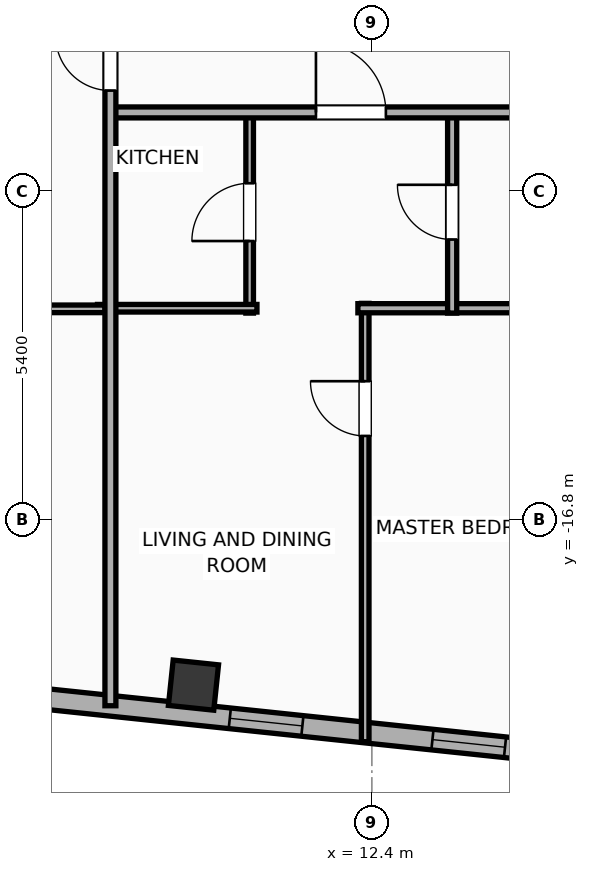
"""IFC4 building model, lengths in metres.
Left out: names, types, materials, properties, quantities, classifications, styles, units other than length and angle.
Written with IfcOpenShell. Run it as: python <this file> out.ifc"""

import sys

from ifc_helpers import new_model, si_unit, direction, frame, frame_2d, origin, origin_2d, place, context, subcontext, project, spatial, rectangle, hollow_rectangle, extrude, element, fill, save


model = new_model("IFC4")
c1 = context("Model", 3, precision=1e-05, world=origin(), true_north=direction((0.0, 1.0)))
c2 = subcontext(c1, "Body", "Model", "MODEL_VIEW")
j1 = project(units=[si_unit("LENGTHUNIT", "METRE"), si_unit("PLANEANGLEUNIT", "RADIAN")], contexts=[c1])
p1 = place(None, origin())
s1 = spatial("IfcSite", under=j1, at=p1, CompositionType="ELEMENT")
p2 = place(p1, origin())
s2 = spatial("IfcBuilding", under=s1, at=p2, CompositionType="ELEMENT")
p3 = place(p2, frame((0.0, 0.0, 299.0)))
s3 = spatial("IfcBuildingStorey", under=s2, at=p3, CompositionType="ELEMENT", Elevation=299.0)
p4 = place(p3, frame((9.466, -19.518, 0.0), z_axis=(0.0, 0.0, 1.0), x_axis=(0.994521895368, -0.104528463268, 0.0)))
e1 = element("IfcColumn", 1, at=p4, inside=s3, PredefinedType="COLUMN", context=c2, shape_type="SweptSolid", body=[
    extrude(hollow_rectangle(XDim=0.75, YDim=0.75, WallThickness=0.025, at=origin_2d()), origin(), (0.0, 0.0, 1.0), 3.9),
])
p5 = place(p3, frame((18.708, -20.972, 0.0), z_axis=(0.0, 0.0, 1.0), x_axis=(-0.994521888554, 0.104528528102, 0.0)))
e2 = element("IfcWall", 2, at=p5, inside=s3, PredefinedType="ELEMENTEDWALL", context=c2, shape_type="SweptSolid", body=[
    extrude(rectangle(XDim=46.766, YDim=0.34, at=frame_2d((23.383, 0.0))), origin(), (0.0, 0.0, 1.0), 3.635),
])
p6 = place(p5, frame((23.733, 0.0, 0.65)))
e3 = element("IfcOpeningElement", 3, at=p6, cuts=e2, PredefinedType="OPENING", context=c2, shape_type="SweptSolid", body=[
    extrude(rectangle(XDim=2.6, YDim=2.45, at=frame_2d((1.3, 1.225))), frame((0.0, 0.18, 0.0), z_axis=(0.0, -1.0, 0.0), x_axis=(1.0, 0.0, 0.0)), (0.0, 0.0, 1.0), 0.36),
])
p7 = place(p5, frame((44.402, 0.0, 0.75)))
e4 = element("IfcOpeningElement", 4, at=p7, cuts=e2, PredefinedType="OPENING", context=c2, shape_type="SweptSolid", body=[
    extrude(rectangle(XDim=1.2, YDim=2.05, at=frame_2d((0.6, 1.025))), frame((0.0, 0.18, 0.0), z_axis=(0.0, -1.0, 0.0), x_axis=(1.0, 0.0, 0.0)), (0.0, 0.0, 1.0), 0.36),
])
p8 = place(p5, frame((39.553, 0.0, 0.75)))
e5 = element("IfcOpeningElement", 5, at=p8, cuts=e2, PredefinedType="OPENING", context=c2, shape_type="SweptSolid", body=[
    extrude(rectangle(XDim=1.2, YDim=2.05, at=frame_2d((0.6, 1.025))), frame((0.0, 0.18, 0.0), z_axis=(0.0, -1.0, 0.0), x_axis=(1.0, 0.0, 0.0)), (0.0, 0.0, 1.0), 0.36),
])
p9 = place(p5, frame((42.419, 0.0, 0.75)))
e6 = element("IfcOpeningElement", 6, at=p9, cuts=e2, PredefinedType="OPENING", context=c2, shape_type="SweptSolid", body=[
    extrude(rectangle(XDim=1.2, YDim=2.05, at=frame_2d((0.6, 1.025))), frame((0.0, 0.18, 0.0), z_axis=(0.0, -1.0, 0.0), x_axis=(1.0, 0.0, 0.0)), (0.0, 0.0, 1.0), 0.36),
])
p10 = place(p5, frame((34.933, 0.0, 0.75)))
e7 = element("IfcOpeningElement", 7, at=p10, cuts=e2, PredefinedType="OPENING", context=c2, shape_type="SweptSolid", body=[
    extrude(rectangle(XDim=1.2, YDim=2.05, at=frame_2d((0.6, 1.025))), frame((0.0, 0.18, 0.0), z_axis=(0.0, -1.0, 0.0), x_axis=(1.0, 0.0, 0.0)), (0.0, 0.0, 1.0), 0.36),
])
p11 = place(p5, frame((28.692, 0.0, 0.75)))
e8 = element("IfcOpeningElement", 8, at=p11, cuts=e2, PredefinedType="OPENING", context=c2, shape_type="SweptSolid", body=[
    extrude(rectangle(XDim=1.2, YDim=2.05, at=frame_2d((0.6, 1.025))), frame((0.0, 0.18, 0.0), z_axis=(0.0, -1.0, 0.0), x_axis=(1.0, 0.0, 0.0)), (0.0, 0.0, 1.0), 0.36),
])
p12 = place(p5, frame((30.957, 0.0, 0.75)))
e9 = element("IfcOpeningElement", 9, at=p12, cuts=e2, PredefinedType="OPENING", context=c2, shape_type="SweptSolid", body=[
    extrude(rectangle(XDim=1.2, YDim=2.05, at=frame_2d((0.6, 1.025))), frame((0.0, 0.18, 0.0), z_axis=(0.0, -1.0, 0.0), x_axis=(1.0, 0.0, 0.0)), (0.0, 0.0, 1.0), 0.36),
])
p13 = place(p5, frame((7.492, 0.0, 0.75)))
e10 = element("IfcOpeningElement", 10, at=p13, cuts=e2, PredefinedType="OPENING", context=c2, shape_type="SweptSolid", body=[
    extrude(rectangle(XDim=1.2, YDim=2.05, at=frame_2d((0.6, 1.025))), frame((0.0, 0.18, 0.0), z_axis=(0.0, -1.0, 0.0), x_axis=(1.0, 0.0, 0.0)), (0.0, 0.0, 1.0), 0.36),
])
p14 = place(p5, frame((4.141, 0.0, 0.75)))
e11 = element("IfcOpeningElement", 11, at=p14, cuts=e2, PredefinedType="OPENING", context=c2, shape_type="SweptSolid", body=[
    extrude(rectangle(XDim=1.2, YDim=2.05, at=frame_2d((0.6, 1.025))), frame((0.0, 0.18, 0.0), z_axis=(0.0, -1.0, 0.0), x_axis=(1.0, 0.0, 0.0)), (0.0, 0.0, 1.0), 0.36),
])
p15 = place(p5, frame((1.36, 0.0, 0.75)))
e12 = element("IfcOpeningElement", 12, at=p15, cuts=e2, PredefinedType="OPENING", context=c2, shape_type="SweptSolid", body=[
    extrude(rectangle(XDim=1.2, YDim=2.05, at=frame_2d((0.6, 1.025))), frame((0.0, 0.18, 0.0), z_axis=(0.0, -1.0, 0.0), x_axis=(1.0, 0.0, 0.0)), (0.0, 0.0, 1.0), 0.36),
])
p16 = place(p5, frame((20.254, 0.0, 0.75)))
e13 = element("IfcOpeningElement", 13, at=p16, cuts=e2, PredefinedType="OPENING", context=c2, shape_type="SweptSolid", body=[
    extrude(rectangle(XDim=1.2, YDim=2.05, at=frame_2d((0.6, 1.025))), frame((0.0, 0.18, 0.0), z_axis=(0.0, -1.0, 0.0), x_axis=(1.0, 0.0, 0.0)), (0.0, 0.0, 1.0), 0.36),
])
p17 = place(p5, frame((16.172, 0.0, 0.75)))
e14 = element("IfcOpeningElement", 14, at=p17, cuts=e2, PredefinedType="OPENING", context=c2, shape_type="SweptSolid", body=[
    extrude(rectangle(XDim=1.2, YDim=2.05, at=frame_2d((0.6, 1.025))), frame((0.0, 0.18, 0.0), z_axis=(0.0, -1.0, 0.0), x_axis=(1.0, 0.0, 0.0)), (0.0, 0.0, 1.0), 0.36),
])
p18 = place(p5, frame((12.11, 0.0, 0.75)))
e15 = element("IfcOpeningElement", 15, at=p18, cuts=e2, PredefinedType="OPENING", context=c2, shape_type="SweptSolid", body=[
    extrude(rectangle(XDim=1.2, YDim=2.05, at=frame_2d((0.6, 1.025))), frame((0.0, 0.18, 0.0), z_axis=(0.0, -1.0, 0.0), x_axis=(1.0, 0.0, 0.0)), (0.0, 0.0, 1.0), 0.36),
])
p19 = place(p3, frame((12.29, -20.448, 0.0), z_axis=(0.0, 0.0, 1.0), x_axis=(0.0, 1.0, 0.0)))
e16 = element("IfcWall", 16, at=p19, inside=s3, PredefinedType="PARTITIONING", context=c2, shape_type="SweptSolid", body=[
    extrude(rectangle(XDim=7.208, YDim=0.125, at=frame_2d((3.604, 0.0))), origin(), (0.0, 0.0, 1.0), 3.635),
])
p20 = place(p19, frame((5.028, 0.0, 0.0)))
e17 = element("IfcOpeningElement", 17, at=p20, cuts=e16, PredefinedType="OPENING", context=c2, shape_type="SweptSolid", body=[
    extrude(rectangle(XDim=0.9, YDim=2.05, at=frame_2d((0.45, 1.025))), frame((0.0, 0.073, 0.0), z_axis=(0.0, -1.0, 0.0), x_axis=(1.0, 0.0, 0.0)), (0.0, 0.0, 1.0), 0.145),
])
p21 = place(p3, frame((12.17, -13.32, 0.0), z_axis=(0.0, 0.0, 1.0), x_axis=(1.0, 0.0, 0.0)))
e18 = element("IfcWall", 18, at=p21, inside=s3, PredefinedType="PLUMBINGWALL", context=c2, shape_type="SweptSolid", body=[
    extrude(rectangle(XDim=3.605, YDim=0.15, at=frame_2d((1.802, 0.0))), origin(), (0.0, 0.0, 1.0), 3.635),
])
p22 = place(p3, frame((10.39, -13.4, 0.0), z_axis=(0.0, 0.0, 1.0), x_axis=(0.0, 1.0, 0.0)))
e19 = element("IfcWall", 19, at=p22, inside=s3, PredefinedType="PARTITIONING", context=c2, shape_type="SweptSolid", body=[
    extrude(rectangle(XDim=3.32, YDim=0.125, at=frame_2d((1.66, 0.0))), origin(), (0.0, 0.0, 1.0), 3.635),
])
p23 = place(p22, frame((1.185, 0.0, 0.0)))
e20 = element("IfcOpeningElement", 20, at=p23, cuts=e19, PredefinedType="OPENING", context=c2, shape_type="SweptSolid", body=[
    extrude(rectangle(XDim=0.95, YDim=2.05, at=frame_2d((0.475, 1.025))), frame((0.0, 0.073, 0.0), z_axis=(0.0, -1.0, 0.0), x_axis=(1.0, 0.0, 0.0)), (0.0, 0.0, 1.0), 0.145),
])
p24 = place(p3, frame((7.887, -13.32, 0.0), z_axis=(0.0, 0.0, 1.0), x_axis=(1.0, 0.0, 0.0)))
e21 = element("IfcWall", 21, at=p24, inside=s3, PredefinedType="PARTITIONING", context=c2, shape_type="SweptSolid", body=[
    extrude(rectangle(XDim=2.623, YDim=0.125, at=frame_2d((1.311, 0.0))), origin(), (0.0, 0.0, 1.0), 3.635),
])
p25 = place(p3, frame((13.72, -13.4, 0.0), z_axis=(0.0, 0.0, 1.0), x_axis=(0.0, 1.0, 0.0)))
e22 = element("IfcWall", 22, at=p25, inside=s3, PredefinedType="PLUMBINGWALL", context=c2, shape_type="SweptSolid", body=[
    extrude(rectangle(XDim=3.32, YDim=0.15, at=frame_2d((1.66, 0.0))), origin(), (0.0, 0.0, 1.0), 3.635),
])
p26 = place(p25, frame((1.21, 0.0, 0.0)))
e23 = element("IfcOpeningElement", 23, at=p26, cuts=e22, PredefinedType="OPENING", context=c2, shape_type="SweptSolid", body=[
    extrude(rectangle(XDim=0.9, YDim=2.05, at=frame_2d((0.45, 1.025))), frame((0.0, 0.085, 0.0), z_axis=(0.0, -1.0, 0.0), x_axis=(1.0, 0.0, 0.0)), (0.0, 0.0, 1.0), 0.17),
])
p27 = place(p3, frame((8.08, -10.1, 0.0), z_axis=(0.0, 0.0, 1.0), x_axis=(1.0, 0.0, 0.0)))
e24 = element("IfcWall", 24, at=p27, inside=s3, PredefinedType="PARTITIONING", context=c2, shape_type="SweptSolid", body=[
    extrude(rectangle(XDim=15.236, YDim=0.18, at=frame_2d((7.618, 0.0))), origin(), (0.0, 0.0, 1.0), 3.635),
])
p28 = place(p27, frame((3.4, 0.0, 0.0)))
e25 = element("IfcOpeningElement", 25, at=p28, cuts=e24, PredefinedType="OPENING", context=c2, shape_type="SweptSolid", body=[
    extrude(rectangle(XDim=1.15, YDim=2.05, at=frame_2d((0.575, 1.025))), frame((0.0, 0.1, 0.0), z_axis=(0.0, -1.0, 0.0), x_axis=(1.0, 0.0, 0.0)), (0.0, 0.0, 1.0), 0.2),
])
p29 = place(p27, frame((11.05, 0.0, 0.0)))
e26 = element("IfcOpeningElement", 26, at=p29, cuts=e24, PredefinedType="OPENING", context=c2, shape_type="SweptSolid", body=[
    extrude(rectangle(XDim=1.15, YDim=2.05, at=frame_2d((0.575, 1.025))), frame((0.0, 0.1, 0.0), z_axis=(0.0, -1.0, 0.0), x_axis=(1.0, 0.0, 0.0)), (0.0, 0.0, 1.0), 0.2),
])
p30 = place(p3, frame((0.02, -13.33, 0.0), z_axis=(0.0, 0.0, 1.0), x_axis=(1.0, 0.0, 0.0)))
e27 = element("IfcWall", 27, at=p30, inside=s3, PredefinedType="PARTITIONING", context=c2, shape_type="SweptSolid", body=[
    extrude(rectangle(XDim=7.992, YDim=0.125, at=frame_2d((3.996, 0.0))), origin(), (0.0, 0.0, 1.0), 3.635),
])
p31 = place(p30, frame((1.323, 0.0, 0.0)))
e28 = element("IfcOpeningElement", 28, at=p31, cuts=e27, PredefinedType="OPENING", context=c2, shape_type="SweptSolid", body=[
    extrude(rectangle(XDim=0.9, YDim=2.05, at=frame_2d((0.45, 1.025))), frame((0.0, 0.073, 0.0), z_axis=(0.0, -1.0, 0.0), x_axis=(1.0, 0.0, 0.0)), (0.0, 0.0, 1.0), 0.145),
])
p32 = place(p30, frame((5.837, 0.0, 0.0)))
e29 = element("IfcOpeningElement", 29, at=p32, cuts=e27, PredefinedType="OPENING", context=c2, shape_type="SweptSolid", body=[
    extrude(rectangle(XDim=0.9, YDim=2.05, at=frame_2d((0.45, 1.025))), frame((0.0, 0.073, 0.0), z_axis=(0.0, -1.0, 0.0), x_axis=(1.0, 0.0, 0.0)), (0.0, 0.0, 1.0), 0.145),
])
p33 = place(p3, frame((8.1, -19.857, 0.0), z_axis=(0.0, 0.0, 1.0), x_axis=(0.0, 1.0, 0.0)))
e30 = element("IfcWall", 30, at=p33, inside=s3, PredefinedType="PARTITIONING", context=c2, shape_type="SweptSolid", body=[
    extrude(rectangle(XDim=11.367, YDim=0.18, at=frame_2d((5.684, 0.0))), origin(), (0.0, 0.0, 1.0), 3.635),
])
p34 = place(p33, frame((10.117, 0.0, 0.0)))
e31 = element("IfcOpeningElement", 31, at=p34, cuts=e30, PredefinedType="OPENING", context=c2, shape_type="SweptSolid", body=[
    extrude(rectangle(XDim=0.9, YDim=2.05, at=frame_2d((0.45, 1.025))), frame((0.0, 0.1, 0.0), z_axis=(0.0, -1.0, 0.0), x_axis=(1.0, 0.0, 0.0)), (0.0, 0.0, 1.0), 0.2),
])
p35 = place(p13, origin())
e32 = element("IfcWindow", 32, at=p35, inside=s3, PartitioningType="SINGLE_PANEL", PredefinedType="WINDOW", context=c2, shape_type="SweptSolid", body=[
    extrude(rectangle(XDim=1.2, YDim=2.05, at=frame_2d((0.6, 1.025))), frame((0.0, 0.03, 0.0), z_axis=(0.0, -1.0, 0.0), x_axis=(1.0, 0.0, 0.0)), (0.0, 0.0, 1.0), 0.06),
])
fill(e10, e32)
p36 = place(p14, origin())
e33 = element("IfcWindow", 33, at=p36, inside=s3, PartitioningType="SINGLE_PANEL", PredefinedType="WINDOW", context=c2, shape_type="SweptSolid", body=[
    extrude(rectangle(XDim=1.2, YDim=2.05, at=frame_2d((0.6, 1.025))), frame((0.0, 0.03, 0.0), z_axis=(0.0, -1.0, 0.0), x_axis=(1.0, 0.0, 0.0)), (0.0, 0.0, 1.0), 0.06),
])
fill(e11, e33)
p37 = place(p20, origin())
e34 = element("IfcDoor", 34, at=p37, inside=s3, OperationType="SINGLE_SWING_RIGHT", PredefinedType="DOOR", context=c2, shape_type="SweptSolid", body=[
    extrude(rectangle(XDim=0.9, YDim=2.05, at=frame_2d((0.45, 1.025))), frame((0.0, 0.025, 0.0), z_axis=(0.0, -1.0, 0.0), x_axis=(1.0, 0.0, 0.0)), (0.0, 0.0, 1.0), 0.05),
])
fill(e17, e34)
p38 = place(p23, origin())
e35 = element("IfcDoor", 35, at=p38, inside=s3, OperationType="SINGLE_SWING_LEFT", PredefinedType="DOOR", context=c2, shape_type="SweptSolid", body=[
    extrude(rectangle(XDim=0.95, YDim=2.05, at=frame_2d((0.475, 1.025))), frame((0.0, 0.025, 0.0), z_axis=(0.0, -1.0, 0.0), x_axis=(1.0, 0.0, 0.0)), (0.0, 0.0, 1.0), 0.05),
])
fill(e20, e35)
p39 = place(p26, origin())
e36 = element("IfcDoor", 36, at=p39, inside=s3, OperationType="SINGLE_SWING_RIGHT", PredefinedType="DOOR", context=c2, shape_type="SweptSolid", body=[
    extrude(rectangle(XDim=0.9, YDim=2.05, at=frame_2d((0.45, 1.025))), frame((0.0, 0.025, 0.0), z_axis=(0.0, -1.0, 0.0), x_axis=(1.0, 0.0, 0.0)), (0.0, 0.0, 1.0), 0.05),
])
fill(e23, e36)
p40 = place(p28, origin())
e37 = element("IfcDoor", 37, at=p40, inside=s3, OperationType="SINGLE_SWING_LEFT", PredefinedType="DOOR", context=c2, shape_type="SweptSolid", body=[
    extrude(rectangle(XDim=1.15, YDim=2.05, at=frame_2d((0.575, 1.025))), frame((0.0, 0.025, 0.0), z_axis=(0.0, -1.0, 0.0), x_axis=(1.0, 0.0, 0.0)), (0.0, 0.0, 1.0), 0.05),
])
fill(e25, e37)
p41 = place(p34, origin())
e38 = element("IfcDoor", 38, at=p41, inside=s3, OperationType="SINGLE_SWING_RIGHT", PredefinedType="DOOR", context=c2, shape_type="SweptSolid", body=[
    extrude(rectangle(XDim=0.9, YDim=2.05, at=frame_2d((0.45, 1.025))), frame((0.0, 0.025, 0.0), z_axis=(0.0, -1.0, 0.0), x_axis=(1.0, 0.0, 0.0)), (0.0, 0.0, 1.0), 0.05),
])
fill(e31, e38)
save(model, sys.argv[1])
